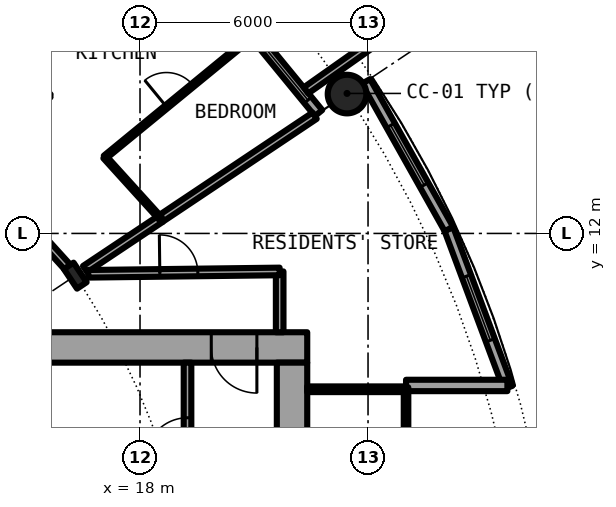
"""IFC4 building model, lengths in metres.
Left out: names, types, materials, properties, quantities, classifications, styles, units other than length and angle.
Written with IfcOpenShell. Run it as: python <this file> out.ifc"""

import sys

from ifc_helpers import new_model, si_unit, direction, frame, frame_2d, origin, origin_2d, place, context, subcontext, project, spatial, rectangle, hollow_circle, i_section, extrude, element, fill, save


model = new_model("IFC4")
c1 = context("Model", 3, precision=1e-05, world=origin(), true_north=direction((0.0, 1.0)))
c2 = subcontext(c1, "Body", "Model", "MODEL_VIEW")
j1 = project(units=[si_unit("LENGTHUNIT", "METRE"), si_unit("PLANEANGLEUNIT", "RADIAN")], contexts=[c1])
p1 = place(None, origin())
s1 = spatial("IfcSite", under=j1, at=p1, CompositionType="ELEMENT")
p2 = place(p1, origin())
s2 = spatial("IfcBuilding", under=s1, at=p2, CompositionType="ELEMENT")
p3 = place(p2, frame((0.0, 0.0, 28.9)))
s3 = spatial("IfcBuildingStorey", under=s2, at=p3, CompositionType="ELEMENT", Elevation=28.9)
p4 = place(p3, frame((23.448, 15.667, 0.0), z_axis=(0.0, 0.0, 1.0), x_axis=(1.0, 0.0, 0.0)))
e1 = element("IfcColumn", 1, at=p4, inside=s3, PredefinedType="COLUMN", context=c2, shape_type="SweptSolid", body=[
    extrude(hollow_circle(Radius=0.508, WallThickness=0.05, at=origin_2d()), origin(), (0.0, 0.0, 1.0), 3.05),
])
p5 = place(p3, frame((16.297, 10.889, 0.0), z_axis=(0.0, 0.0, 1.0), x_axis=(0.831469612303, 0.55557023302, 0.0)))
e2 = element("IfcColumn", 2, at=p5, inside=s3, PredefinedType="COLUMN", context=c2, shape_type="SweptSolid", body=[
    extrude(i_section(OverallWidth=0.305, OverallDepth=0.62, WebThickness=0.021, FlangeThickness=0.04, FilletRadius=0.027, at=origin_2d()), origin(), (0.0, 0.0, 1.0), 3.05),
])
p6 = place(p3, frame((22.699, 15.167, 0.0), z_axis=(0.0, 0.0, 1.0), x_axis=(-0.634382322723, 0.773019449054, 0.0)))
e3 = element("IfcWall", 3, at=p6, inside=s3, PredefinedType="SOLIDWALL", context=c2, shape_type="SweptSolid", body=[
    extrude(rectangle(XDim=5.352, YDim=0.25, at=frame_2d((2.676, 0.0))), origin(), (0.0, 0.0, 1.0), 2.7),
])
p7 = place(p6, frame((0.441, 0.0, 0.3)))
e4 = element("IfcOpeningElement", 4, at=p7, cuts=e3, PredefinedType="OPENING", context=c2, shape_type="SweptSolid", body=[
    extrude(rectangle(XDim=1.8, YDim=2.1, at=frame_2d((0.9, 1.05))), frame((0.0, 0.135, 0.0), z_axis=(0.0, -1.0, 0.0), x_axis=(1.0, 0.0, 0.0)), (0.0, 0.0, 1.0), 0.27),
])
p8 = place(p6, frame((3.51, 0.0, 0.0)))
e5 = element("IfcOpeningElement", 5, at=p8, cuts=e3, PredefinedType="OPENING", context=c2, shape_type="SweptSolid", body=[
    extrude(rectangle(XDim=1.0, YDim=2.2, at=frame_2d((0.5, 1.1))), frame((0.0, 0.135, 0.0), z_axis=(0.0, -1.0, 0.0), x_axis=(1.0, 0.0, 0.0)), (0.0, 0.0, 1.0), 0.27),
])
p9 = place(p3, frame((22.37, 15.765, -0.03), z_axis=(0.0, 0.0, 1.0), x_axis=(0.817256123454, 0.576274612209, 0.0)))
e6 = element("IfcWall", 6, at=p9, inside=s3, PredefinedType="SOLIDWALL", context=c2, shape_type="SweptSolid", body=[
    extrude(rectangle(XDim=2.933, YDim=0.2, at=frame_2d((1.466, 0.0))), origin(), (0.0, 0.0, 1.0), 2.73),
])
p10 = place(p3, frame((27.682, 7.945, 0.0), z_axis=(0.0, 0.0, 1.0), x_axis=(-0.349247811493, 0.937030397675, 0.0)))
e7 = element("IfcWall", 7, at=p10, inside=s3, PredefinedType="SOLIDWALL", context=c2, shape_type="SweptSolid", body=[
    extrude(rectangle(XDim=4.452, YDim=0.25, at=frame_2d((2.226, 0.0))), origin(), (0.0, 0.0, 1.0), 2.7),
])
p11 = place(p10, frame((1.327, 0.0, 0.3)))
e8 = element("IfcOpeningElement", 8, at=p11, cuts=e7, PredefinedType="OPENING", context=c2, shape_type="SweptSolid", body=[
    extrude(rectangle(XDim=1.8, YDim=2.1, at=frame_2d((0.9, 1.05))), frame((0.0, 0.135, 0.0), z_axis=(0.0, -1.0, 0.0), x_axis=(1.0, 0.0, 0.0)), (0.0, 0.0, 1.0), 0.27),
])
p12 = place(p3, frame((26.127, 12.117, 0.0), z_axis=(0.0, 0.0, 1.0), x_axis=(-0.489696356642, 0.871893042919, 0.0)))
e9 = element("IfcWall", 9, at=p12, inside=s3, PredefinedType="SOLIDWALL", context=c2, shape_type="SweptSolid", body=[
    extrude(rectangle(XDim=4.454, YDim=0.25, at=frame_2d((2.227, 0.0))), origin(), (0.0, 0.0, 1.0), 2.7),
])
p13 = place(p12, frame((1.327, 0.0, 0.3)))
e10 = element("IfcOpeningElement", 10, at=p13, cuts=e9, PredefinedType="OPENING", context=c2, shape_type="SweptSolid", body=[
    extrude(rectangle(XDim=1.8, YDim=2.1, at=frame_2d((0.9, 1.05))), frame((0.0, 0.135, 0.0), z_axis=(0.0, -1.0, 0.0), x_axis=(1.0, 0.0, 0.0)), (0.0, 0.0, 1.0), 0.27),
])
p14 = place(p3, frame((25.0, 8.0, 0.0), z_axis=(0.0, 0.0, 1.0), x_axis=(1.0, 0.0, 0.0)))
e11 = element("IfcWall", 11, at=p14, inside=s3, PredefinedType="SOLIDWALL", context=c2, shape_type="SweptSolid", body=[
    extrude(rectangle(XDim=2.667, YDim=0.3, at=frame_2d((1.333, 0.0))), origin(), (0.0, 0.0, 1.0), 2.7),
])
p15 = place(p3, frame((22.4, 9.0, 0.0), z_axis=(0.0, 0.0, 1.0), x_axis=(-1.0, 0.0, 0.0)))
e12 = element("IfcWall", 12, at=p15, inside=s3, PredefinedType="SHEAR", context=c2, shape_type="SweptSolid", body=[
    extrude(rectangle(XDim=14.2, YDim=0.8, at=frame_2d((7.1, 0.0))), origin(), (0.0, 0.0, 1.0), 3.05),
])
p16 = place(p15, frame((1.325, 0.0, 0.0)))
e13 = element("IfcOpeningElement", 13, at=p16, cuts=e12, PredefinedType="OPENING", context=c2, shape_type="SweptSolid", body=[
    extrude(rectangle(XDim=1.2, YDim=2.3, at=frame_2d((0.6, 1.15))), frame((0.0, 0.41, 0.0), z_axis=(0.0, -1.0, 0.0), x_axis=(1.0, 0.0, 0.0)), (0.0, 0.0, 1.0), 0.82),
])
p17 = place(p3, frame((22.0, 8.6, 0.0), z_axis=(0.0, 0.0, 1.0), x_axis=(0.0, -1.0, 0.0)))
e14 = element("IfcWall", 14, at=p17, inside=s3, PredefinedType="SHEAR", context=c2, shape_type="SweptSolid", body=[
    extrude(rectangle(XDim=17.2, YDim=0.8, at=frame_2d((8.6, 0.0))), origin(), (0.0, 0.0, 1.0), 3.05),
])
p18 = place(p17, frame((7.7, 0.0, 0.0)))
e15 = element("IfcOpeningElement", 15, at=p18, cuts=e14, PredefinedType="OPENING", context=c2, shape_type="SweptSolid", body=[
    extrude(rectangle(XDim=1.8, YDim=2.3, at=frame_2d((0.9, 1.15))), frame((0.0, 0.41, 0.0), z_axis=(0.0, -1.0, 0.0), x_axis=(1.0, 0.0, 0.0)), (0.0, 0.0, 1.0), 0.82),
])
p19 = place(p3, frame((19.25, 1.575, 0.0), z_axis=(0.0, 0.0, 1.0), x_axis=(0.0, 1.0, 0.0)))
e16 = element("IfcWall", 16, at=p19, inside=s3, PredefinedType="SOLIDWALL", context=c2, shape_type="SweptSolid", body=[
    extrude(rectangle(XDim=7.025, YDim=0.2, at=frame_2d((3.513, 0.0))), origin(), (0.0, 0.0, 1.0), 2.7),
])
p20 = place(p19, frame((4.475, 0.0, 0.0)))
e17 = element("IfcOpeningElement", 17, at=p20, cuts=e16, PredefinedType="OPENING", context=c2, shape_type="SweptSolid", body=[
    extrude(rectangle(XDim=1.1, YDim=2.3, at=frame_2d((0.55, 1.15))), frame((0.0, 0.11, 0.0), z_axis=(0.0, -1.0, 0.0), x_axis=(1.0, 0.0, 0.0)), (0.0, 0.0, 1.0), 0.22),
])
p21 = place(p3, frame((22.4, 7.9, 0.0), z_axis=(0.0, 0.0, 1.0), x_axis=(1.0, 0.0, 0.0)))
e18 = element("IfcWall", 18, at=p21, inside=s3, PredefinedType="PARTITIONING", context=c2, shape_type="SweptSolid", body=[
    extrude(rectangle(XDim=2.54, YDim=0.15, at=frame_2d((1.27, 0.0))), origin(), (0.0, 0.0, 1.0), 2.7),
])
p22 = place(p3, frame((25.0, -7.95, 0.0), z_axis=(0.0, 0.0, 1.0), x_axis=(0.0, 1.0, 0.0)))
e19 = element("IfcWall", 19, at=p22, inside=s3, PredefinedType="PARTITIONING", context=c2, shape_type="SweptSolid", body=[
    extrude(rectangle(XDim=15.9, YDim=0.12, at=frame_2d((7.95, 0.0))), origin(), (0.0, 0.0, 1.0), 2.7),
])
p23 = place(p22, frame((0.95, 0.0, 0.1)))
e20 = element("IfcOpeningElement", 20, at=p23, cuts=e19, PredefinedType="OPENING", context=c2, shape_type="SweptSolid", body=[
    extrude(rectangle(XDim=14.0, YDim=2.35, at=frame_2d((7.0, 1.175))), frame((0.0, 0.07, 0.0), z_axis=(0.0, -1.0, 0.0), x_axis=(1.0, 0.0, 0.0)), (0.0, 0.0, 1.0), 0.14),
])
p24 = place(p3, frame((21.675, 9.4, 0.0), z_axis=(0.0, 0.0, 1.0), x_axis=(0.0, 1.0, 0.0)))
e21 = element("IfcWall", 21, at=p24, inside=s3, PredefinedType="PARTITIONING", context=c2, shape_type="SweptSolid", body=[
    extrude(rectangle(XDim=1.6, YDim=0.2, at=frame_2d((0.8, 0.0))), origin(), (0.0, 0.0, 1.0), 2.7),
])
p25 = place(p3, frame((12.434, 15.151, 0.0), z_axis=(0.0, 0.0, 1.0), x_axis=(0.634381303318, 0.773020285633, 0.0)))
e22 = element("IfcWall", 22, at=p25, inside=s3, PredefinedType="PARTITIONING", context=c2, shape_type="SweptSolid", body=[
    extrude(rectangle(XDim=7.576, YDim=0.2, at=frame_2d((3.788, 0.0))), origin(), (0.0, 0.0, 1.0), 2.7),
])
p26 = place(p3, frame((17.077, 14.006, 0.0), z_axis=(0.0, 0.0, 1.0), x_axis=(0.77326214499, 0.634086472908, 0.0)))
e23 = element("IfcWall", 23, at=p26, inside=s3, PredefinedType="PARTITIONING", context=c2, shape_type="SweptSolid", body=[
    extrude(rectangle(XDim=5.089, YDim=0.1, at=frame_2d((2.544, 0.0))), origin(), (0.0, 0.0, 1.0), 2.7),
])
p27 = place(p26, frame((2.094, 0.0, 0.0)))
e24 = element("IfcOpeningElement", 24, at=p27, cuts=e23, PredefinedType="OPENING", context=c2, shape_type="SweptSolid", body=[
    extrude(rectangle(XDim=0.9, YDim=2.3, at=frame_2d((0.45, 1.15))), frame((0.0, 0.06, 0.0), z_axis=(0.0, -1.0, 0.0), x_axis=(1.0, 0.0, 0.0)), (0.0, 0.0, 1.0), 0.12),
])
p28 = place(p3, frame((18.542, 12.389, 0.0), z_axis=(0.0, 0.0, 1.0), x_axis=(0.831387096605, 0.55569370664, 0.0)))
e25 = element("IfcWall", 25, at=p28, inside=s3, PredefinedType="PARTITIONING", context=c2, shape_type="SweptSolid", body=[
    extrude(rectangle(XDim=4.875, YDim=0.2, at=frame_2d((2.438, 0.0))), origin(), (0.0, 0.0, 1.0), 2.7),
])
p29 = place(p3, frame((16.555, 11.061, 0.0), z_axis=(0.0, 0.0, 1.0), x_axis=(0.832066006555, 0.554676627176, 0.0)))
e26 = element("IfcWall", 26, at=p29, inside=s3, PredefinedType="PARTITIONING", context=c2, shape_type="SweptSolid", body=[
    extrude(rectangle(XDim=2.39, YDim=0.2, at=frame_2d((1.195, 0.0))), origin(), (0.0, 0.0, 1.0), 2.7),
])
p30 = place(p3, frame((16.637, 10.938, 0.0), z_axis=(0.0, 0.0, 1.0), x_axis=(0.99992425795, 0.012307654658, 0.0)))
e27 = element("IfcWall", 27, at=p30, inside=s3, PredefinedType="PARTITIONING", context=c2, shape_type="SweptSolid", body=[
    extrude(rectangle(XDim=5.039, YDim=0.2, at=frame_2d((2.519, 0.0))), origin(), (0.0, 0.0, 1.0), 2.7),
])
p31 = place(p30, frame((1.884, 0.0, 0.0)))
e28 = element("IfcOpeningElement", 28, at=p31, cuts=e27, PredefinedType="OPENING", context=c2, shape_type="SweptSolid", body=[
    extrude(rectangle(XDim=1.0, YDim=2.3, at=frame_2d((0.5, 1.15))), frame((0.0, 0.11, 0.0), z_axis=(0.0, -1.0, 0.0), x_axis=(1.0, 0.0, 0.0)), (0.0, 0.0, 1.0), 0.22),
])
p32 = place(p3, frame((12.434, 15.151, 0.0), z_axis=(0.0, 0.0, 1.0), x_axis=(0.671514934772, -0.740991020444, 0.0)))
e29 = element("IfcWall", 29, at=p32, inside=s3, PredefinedType="PARTITIONING", context=c2, shape_type="SweptSolid", body=[
    extrude(rectangle(XDim=5.598, YDim=0.2, at=frame_2d((2.799, 0.0))), origin(), (0.0, 0.0, 1.0), 2.38),
])
p33 = place(p32, frame((3.305, 0.0, 0.0)))
e30 = element("IfcOpeningElement", 30, at=p33, cuts=e29, PredefinedType="OPENING", context=c2, shape_type="SweptSolid", body=[
    extrude(rectangle(XDim=1.0, YDim=2.3, at=frame_2d((0.5, 1.15))), frame((0.0, 0.11, 0.0), z_axis=(0.0, -1.0, 0.0), x_axis=(1.0, 0.0, 0.0)), (0.0, 0.0, 1.0), 0.22),
])
p34 = place(p3, frame((17.072, 14.011, 0.0), z_axis=(0.0, 0.0, 1.0), x_axis=(0.67169789574, -0.740825172937, 0.0)))
e31 = element("IfcWall", 31, at=p34, inside=s3, PredefinedType="PARTITIONING", context=c2, shape_type="SweptSolid", body=[
    extrude(rectangle(XDim=2.183, YDim=0.1, at=frame_2d((1.091, 0.0))), origin(), (0.0, 0.0, 1.0), 2.7),
])
p35 = place(p7, origin())
e32 = element("IfcWindow", 32, at=p35, inside=s3, PartitioningType="SINGLE_PANEL", PredefinedType="WINDOW", context=c2, shape_type="SweptSolid", body=[
    extrude(rectangle(XDim=1.8, YDim=2.1, at=frame_2d((0.9, 1.05))), frame((0.0, 0.03, 0.0), z_axis=(0.0, -1.0, 0.0), x_axis=(1.0, 0.0, 0.0)), (0.0, 0.0, 1.0), 0.06),
])
fill(e4, e32)
p36 = place(p11, origin())
e33 = element("IfcWindow", 33, at=p36, inside=s3, PartitioningType="SINGLE_PANEL", PredefinedType="WINDOW", context=c2, shape_type="SweptSolid", body=[
    extrude(rectangle(XDim=1.8, YDim=2.1, at=frame_2d((0.9, 1.05))), frame((0.0, 0.03, 0.0), z_axis=(0.0, -1.0, 0.0), x_axis=(1.0, 0.0, 0.0)), (0.0, 0.0, 1.0), 0.06),
])
fill(e8, e33)
p37 = place(p13, origin())
e34 = element("IfcWindow", 34, at=p37, inside=s3, PartitioningType="SINGLE_PANEL", PredefinedType="WINDOW", context=c2, shape_type="SweptSolid", body=[
    extrude(rectangle(XDim=1.8, YDim=2.1, at=frame_2d((0.9, 1.05))), frame((0.0, 0.03, 0.0), z_axis=(0.0, -1.0, 0.0), x_axis=(1.0, 0.0, 0.0)), (0.0, 0.0, 1.0), 0.06),
])
fill(e10, e34)
p38 = place(p20, origin())
e35 = element("IfcDoor", 35, at=p38, inside=s3, OperationType="SINGLE_SWING_LEFT", PredefinedType="DOOR", context=c2, shape_type="SweptSolid", body=[
    extrude(rectangle(XDim=1.1, YDim=2.3, at=frame_2d((0.55, 1.15))), frame((0.0, 0.025, 0.0), z_axis=(0.0, -1.0, 0.0), x_axis=(1.0, 0.0, 0.0)), (0.0, 0.0, 1.0), 0.05),
])
fill(e17, e35)
p39 = place(p16, origin())
e36 = element("IfcDoor", 36, at=p39, inside=s3, OperationType="SINGLE_SWING_RIGHT", PredefinedType="DOOR", context=c2, shape_type="SweptSolid", body=[
    extrude(rectangle(XDim=1.2, YDim=2.3, at=frame_2d((0.6, 1.15))), frame((0.0, 0.025, 0.0), z_axis=(0.0, -1.0, 0.0), x_axis=(1.0, 0.0, 0.0)), (0.0, 0.0, 1.0), 0.05),
])
fill(e13, e36)
p40 = place(p23, origin())
e37 = element("IfcWindow", 37, at=p40, inside=s3, PartitioningType="SINGLE_PANEL", PredefinedType="WINDOW", context=c2, shape_type="SweptSolid", body=[
    extrude(rectangle(XDim=14.0, YDim=2.35, at=frame_2d((7.0, 1.175))), frame((0.0, 0.03, 0.0), z_axis=(0.0, -1.0, 0.0), x_axis=(1.0, 0.0, 0.0)), (0.0, 0.0, 1.0), 0.06),
])
fill(e20, e37)
p41 = place(p27, origin())
e38 = element("IfcDoor", 38, at=p41, inside=s3, OperationType="SINGLE_SWING_RIGHT", PredefinedType="DOOR", context=c2, shape_type="SweptSolid", body=[
    extrude(rectangle(XDim=0.9, YDim=2.3, at=frame_2d((0.45, 1.15))), frame((0.0, 0.025, 0.0), z_axis=(0.0, -1.0, 0.0), x_axis=(1.0, 0.0, 0.0)), (0.0, 0.0, 1.0), 0.05),
])
fill(e24, e38)
p42 = place(p31, origin())
e39 = element("IfcDoor", 39, at=p42, inside=s3, OperationType="SINGLE_SWING_LEFT", PredefinedType="DOOR", context=c2, shape_type="SweptSolid", body=[
    extrude(rectangle(XDim=1.0, YDim=2.3, at=frame_2d((0.5, 1.15))), frame((0.0, 0.025, 0.0), z_axis=(0.0, -1.0, 0.0), x_axis=(1.0, 0.0, 0.0)), (0.0, 0.0, 1.0), 0.05),
])
fill(e28, e39)
save(model, sys.argv[1])
